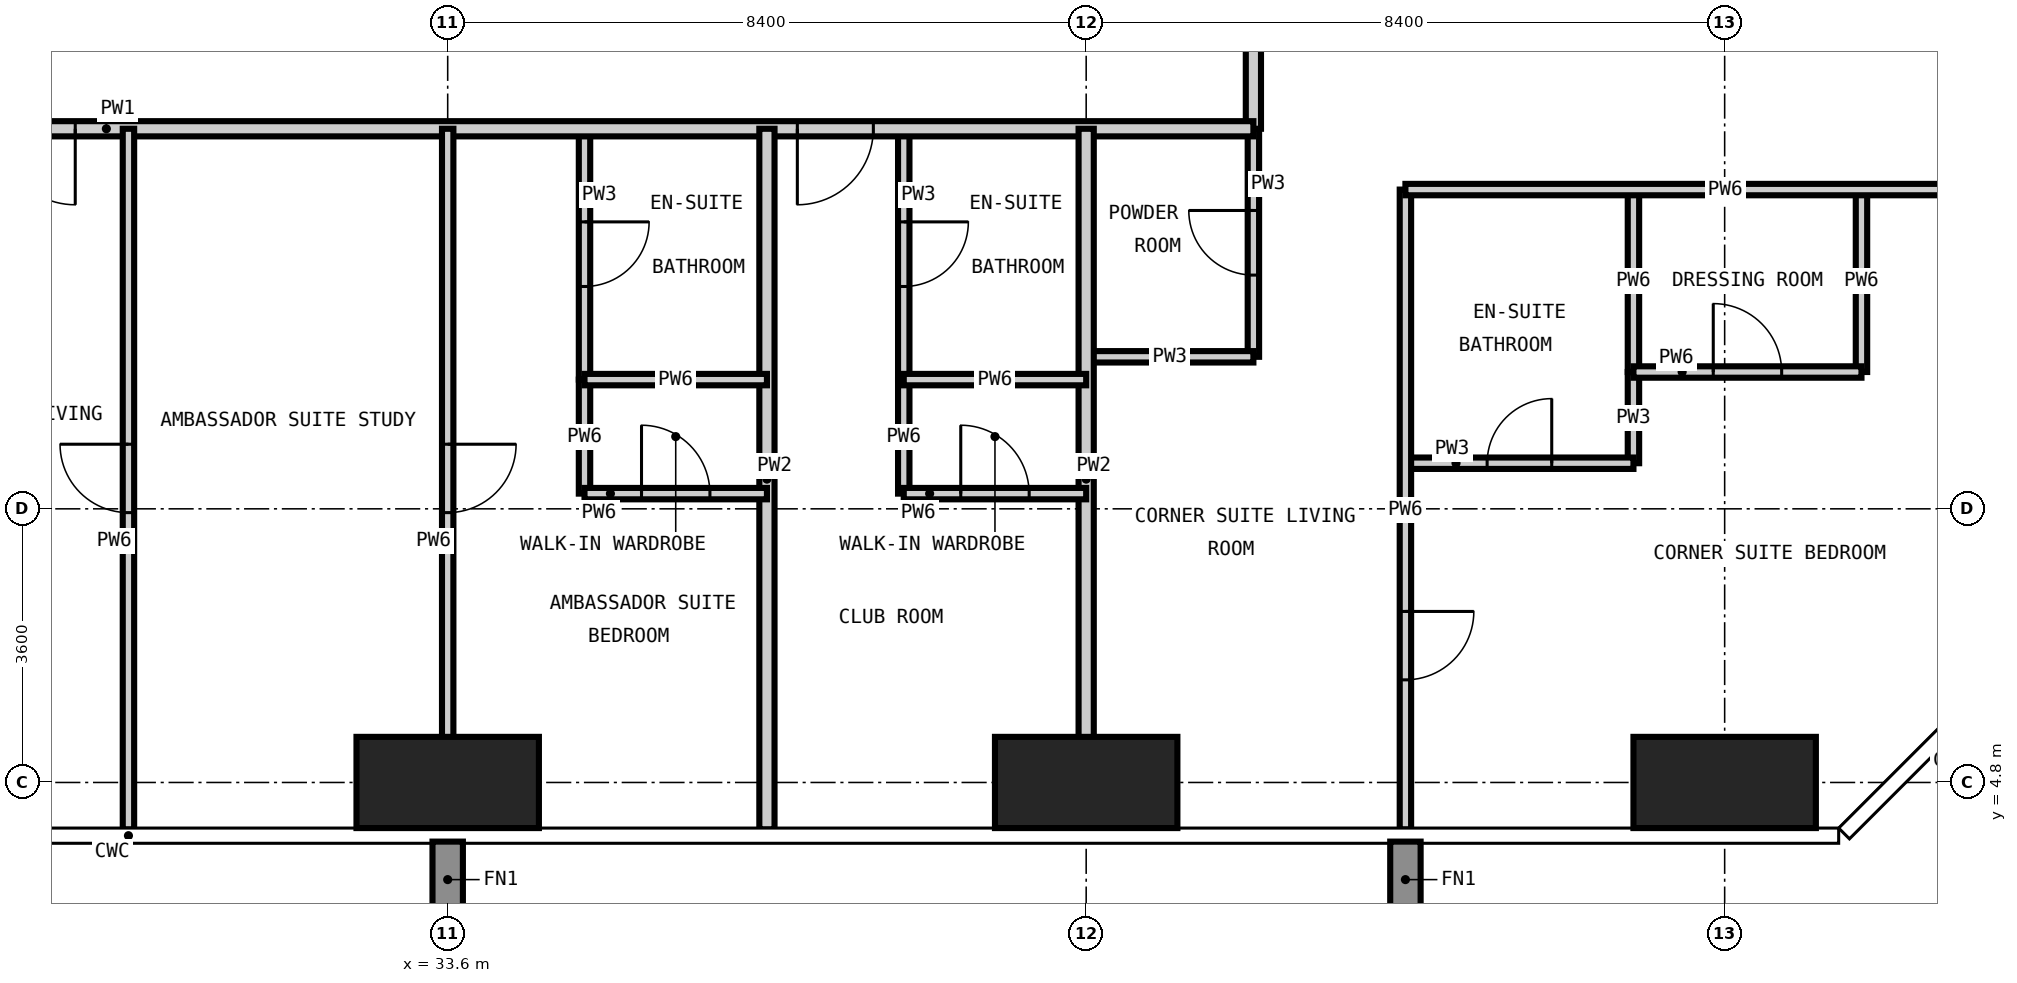
"""IFC4 building model, lengths in metres.
Left out: names, types, materials, properties, quantities, classifications, styles, units other than length and angle.
Written with IfcOpenShell. Run it as: python <this file> out.ifc"""

import sys

from ifc_helpers import new_model, si_unit, direction, frame, frame_2d, origin, origin_2d, place, context, subcontext, project, spatial, rectangle, extrude, element, fill, save


model = new_model("IFC4")
c1 = context("Model", 3, precision=1e-05, world=origin(), true_north=direction((0.0, 1.0)))
c2 = subcontext(c1, "Body", "Model", "MODEL_VIEW")
j1 = project(units=[si_unit("LENGTHUNIT", "METRE"), si_unit("PLANEANGLEUNIT", "RADIAN")], contexts=[c1])
p1 = place(None, origin())
s1 = spatial("IfcSite", under=j1, at=p1, CompositionType="ELEMENT")
p2 = place(p1, origin())
s2 = spatial("IfcBuilding", under=s1, at=p2, CompositionType="ELEMENT")
p3 = place(p2, frame((0.0, 0.0, 198.6)))
s3 = spatial("IfcBuildingStorey", under=s2, at=p3, CompositionType="ELEMENT", Elevation=198.6)
for number, where, z_axis, x_axis in (
    (1, (33.6, 4.8, -0.35), (0.0, 0.0, 1.0), (1.0, 0.0, 0.0)),
    (2, (42.0, 4.8, -0.35), (0.0, 0.0, 1.0), (1.0, 0.0, 0.0)),
    (3, (50.4, 4.8, -0.35), (0.0, 0.0, 1.0), (1.0, 0.0, 0.0)),
):
    element("IfcColumn", number, at=place(p3, frame(where, z_axis=z_axis, x_axis=x_axis)), inside=s3, PredefinedType="COLUMN", context=c2, shape_type="SweptSolid", body=[
        extrude(rectangle(XDim=2.4, YDim=1.2, at=origin_2d()), origin(), (0.0, 0.0, 1.0), 3.6),
    ])
p4 = place(p3, frame((35.4, 10.1, 0.0), z_axis=(0.0, 0.0, 1.0), x_axis=(0.0, 1.0, 0.0)))
e4 = element("IfcWall", 4, at=p4, inside=s3, PredefinedType="PARTITIONING", context=c2, shape_type="SweptSolid", body=[
    extrude(rectangle(XDim=3.3, YDim=0.15, at=frame_2d((1.65, 0.0))), origin(), (0.0, 0.0, 1.0), 3.25),
])
p5 = place(p4, frame((1.225, 0.0, 0.0)))
e5 = element("IfcOpeningElement", 5, at=p5, cuts=e4, PredefinedType="OPENING", context=c2, shape_type="SweptSolid", body=[
    extrude(rectangle(XDim=0.85, YDim=2.1, at=frame_2d((0.425, 1.05))), frame((0.0, 0.085, 0.0), z_axis=(0.0, -1.0, 0.0), x_axis=(1.0, 0.0, 0.0)), (0.0, 0.0, 1.0), 0.17),
])
p6 = place(p3, frame((39.6, 10.1, 0.0), z_axis=(0.0, 0.0, 1.0), x_axis=(0.0, 1.0, 0.0)))
e6 = element("IfcWall", 6, at=p6, inside=s3, PredefinedType="PARTITIONING", context=c2, shape_type="SweptSolid", body=[
    extrude(rectangle(XDim=3.3, YDim=0.15, at=frame_2d((1.65, 0.0))), origin(), (0.0, 0.0, 1.0), 3.25),
])
p7 = place(p6, frame((1.225, 0.0, 0.0)))
e7 = element("IfcOpeningElement", 7, at=p7, cuts=e6, PredefinedType="OPENING", context=c2, shape_type="SweptSolid", body=[
    extrude(rectangle(XDim=0.85, YDim=2.1, at=frame_2d((0.425, 1.05))), frame((0.0, 0.085, 0.0), z_axis=(0.0, -1.0, 0.0), x_axis=(1.0, 0.0, 0.0)), (0.0, 0.0, 1.0), 0.17),
])
p8 = place(p3, frame((44.2, 10.4, 0.0), z_axis=(0.0, 0.0, 1.0), x_axis=(0.0, 1.0, 0.0)))
e8 = element("IfcWall", 8, at=p8, inside=s3, PredefinedType="PARTITIONING", context=c2, shape_type="SweptSolid", body=[
    extrude(rectangle(XDim=3.0, YDim=0.15, at=frame_2d((1.5, 0.0))), origin(), (0.0, 0.0, 1.0), 3.25),
])
p9 = place(p8, frame((1.075, 0.0, 0.0)))
e9 = element("IfcOpeningElement", 9, at=p9, cuts=e8, PredefinedType="OPENING", context=c2, shape_type="SweptSolid", body=[
    extrude(rectangle(XDim=0.85, YDim=2.1, at=frame_2d((0.425, 1.05))), frame((0.0, 0.085, 0.0), z_axis=(0.0, -1.0, 0.0), x_axis=(1.0, 0.0, 0.0)), (0.0, 0.0, 1.0), 0.17),
])
p10 = place(p3, frame((49.2, 9.0, 0.0), z_axis=(0.0, 0.0, 1.0), x_axis=(0.0, 1.0, 0.0)))
e10 = element("IfcWall", 10, at=p10, inside=s3, PredefinedType="PARTITIONING", context=c2, shape_type="SweptSolid", body=[
    extrude(rectangle(XDim=1.2, YDim=0.15, at=frame_2d((0.6, 0.0))), origin(), (0.0, 0.0, 1.0), 3.25),
])
p11 = place(p3, frame((46.2, 9.0, 0.0), z_axis=(0.0, 0.0, 1.0), x_axis=(1.0, 0.0, 0.0)))
e11 = element("IfcWall", 11, at=p11, inside=s3, PredefinedType="PARTITIONING", context=c2, shape_type="SweptSolid", body=[
    extrude(rectangle(XDim=3.0, YDim=0.15, at=frame_2d((1.5, 0.0))), origin(), (0.0, 0.0, 1.0), 3.25),
])
p12 = place(p11, frame((1.075, 0.0, 0.0)))
e12 = element("IfcOpeningElement", 12, at=p12, cuts=e11, PredefinedType="OPENING", context=c2, shape_type="SweptSolid", body=[
    extrude(rectangle(XDim=0.85, YDim=2.1, at=frame_2d((0.425, 1.05))), frame((0.0, 0.085, 0.0), z_axis=(0.0, -1.0, 0.0), x_axis=(1.0, 0.0, 0.0)), (0.0, 0.0, 1.0), 0.17),
])
p13 = place(p3, frame((42.0, 10.4, 0.0), z_axis=(0.0, 0.0, 1.0), x_axis=(1.0, 0.0, 0.0)))
e13 = element("IfcWall", 13, at=p13, inside=s3, PredefinedType="PARTITIONING", context=c2, shape_type="SweptSolid", body=[
    extrude(rectangle(XDim=2.2, YDim=0.15, at=frame_2d((1.1, 0.0))), origin(), (0.0, 0.0, 1.0), 3.25),
])
p14 = place(p3, frame((44.2, 44.8, 0.0), z_axis=(0.0, 0.0, 1.0), x_axis=(0.0, -1.0, 0.0)))
e14 = element("IfcWall", 14, at=p14, inside=s3, PredefinedType="PARTITIONING", context=c2, shape_type="SweptSolid", body=[
    extrude(rectangle(XDim=31.4, YDim=0.2, at=frame_2d((15.7, 0.0))), origin(), (0.0, 0.0, 1.0), 3.25),
])
p15 = place(p14, frame((21.2, 0.0, 0.0)))
e15 = element("IfcOpeningElement", 15, at=p15, cuts=e14, PredefinedType="OPENING", context=c2, shape_type="SweptSolid", body=[
    extrude(rectangle(XDim=1.0, YDim=2.2, at=frame_2d((0.5, 1.1))), frame((0.0, 0.11, 0.0), z_axis=(0.0, -1.0, 0.0), x_axis=(1.0, 0.0, 0.0)), (0.0, 0.0, 1.0), 0.22),
])
p16 = place(p14, frame((8.6, 0.0, 0.0)))
e16 = element("IfcOpeningElement", 16, at=p16, cuts=e14, PredefinedType="OPENING", context=c2, shape_type="SweptSolid", body=[
    extrude(rectangle(XDim=1.0, YDim=2.2, at=frame_2d((0.5, 1.1))), frame((0.0, 0.11, 0.0), z_axis=(0.0, -1.0, 0.0), x_axis=(1.0, 0.0, 0.0)), (0.0, 0.0, 1.0), 0.22),
])
p17 = place(p14, frame((29.2, 0.0, 0.0)))
e17 = element("IfcOpeningElement", 17, at=p17, cuts=e14, PredefinedType="OPENING", context=c2, shape_type="SweptSolid", body=[
    extrude(rectangle(XDim=1.0, YDim=2.2, at=frame_2d((0.5, 1.1))), frame((0.0, 0.11, 0.0), z_axis=(0.0, -1.0, 0.0), x_axis=(1.0, 0.0, 0.0)), (0.0, 0.0, 1.0), 0.22),
])
p18 = place(p14, frame((0.9, 0.0, 0.0)))
e18 = element("IfcOpeningElement", 18, at=p18, cuts=e14, PredefinedType="OPENING", context=c2, shape_type="SweptSolid", body=[
    extrude(rectangle(XDim=1.0, YDim=2.2, at=frame_2d((0.5, 1.1))), frame((0.0, 0.11, 0.0), z_axis=(0.0, -1.0, 0.0), x_axis=(1.0, 0.0, 0.0)), (0.0, 0.0, 1.0), 0.22),
])
p19 = place(p3, frame((44.2, 13.4, 0.0), z_axis=(0.0, 0.0, 1.0), x_axis=(-1.0, 0.0, 0.0)))
e19 = element("IfcWall", 19, at=p19, inside=s3, PredefinedType="PARTITIONING", context=c2, shape_type="SweptSolid", body=[
    extrude(rectangle(XDim=30.8, YDim=0.2, at=frame_2d((15.4, 0.0))), origin(), (0.0, 0.0, 1.0), 3.25),
])
p20 = place(p19, frame((23.6, 0.0, 0.0)))
e20 = element("IfcOpeningElement", 20, at=p20, cuts=e19, PredefinedType="OPENING", context=c2, shape_type="SweptSolid", body=[
    extrude(rectangle(XDim=1.0, YDim=2.2, at=frame_2d((0.5, 1.1))), frame((0.0, 0.11, 0.0), z_axis=(0.0, -1.0, 0.0), x_axis=(1.0, 0.0, 0.0)), (0.0, 0.0, 1.0), 0.22),
])
p21 = place(p19, frame((21.8, 0.0, 0.0)))
e21 = element("IfcOpeningElement", 21, at=p21, cuts=e19, PredefinedType="OPENING", context=c2, shape_type="SweptSolid", body=[
    extrude(rectangle(XDim=1.0, YDim=2.2, at=frame_2d((0.5, 1.1))), frame((0.0, 0.11, 0.0), z_axis=(0.0, -1.0, 0.0), x_axis=(1.0, 0.0, 0.0)), (0.0, 0.0, 1.0), 0.22),
])
p22 = place(p19, frame((15.5, 0.0, 0.0)))
e22 = element("IfcOpeningElement", 22, at=p22, cuts=e19, PredefinedType="OPENING", context=c2, shape_type="SweptSolid", body=[
    extrude(rectangle(XDim=1.0, YDim=2.2, at=frame_2d((0.5, 1.1))), frame((0.0, 0.11, 0.0), z_axis=(0.0, -1.0, 0.0), x_axis=(1.0, 0.0, 0.0)), (0.0, 0.0, 1.0), 0.22),
])
p23 = place(p19, frame((5.0, 0.0, 0.0)))
e23 = element("IfcOpeningElement", 23, at=p23, cuts=e19, PredefinedType="OPENING", context=c2, shape_type="SweptSolid", body=[
    extrude(rectangle(XDim=1.0, YDim=2.2, at=frame_2d((0.5, 1.1))), frame((0.0, 0.11, 0.0), z_axis=(0.0, -1.0, 0.0), x_axis=(1.0, 0.0, 0.0)), (0.0, 0.0, 1.0), 0.22),
])
for number, where, z_axis, x_axis in (
    (24, (37.8, 4.182, 0.0), (0.0, 0.0, 1.0), (0.0, 1.0, 0.0)),
    (25, (42.0, 4.182, 0.0), (0.0, 0.0, 1.0), (0.0, 1.0, 0.0)),
):
    element("IfcWall", number, at=place(p3, frame(where, z_axis=z_axis, x_axis=x_axis)), inside=s3, PredefinedType="PARTITIONING", context=c2, shape_type="SweptSolid", body=[
        extrude(rectangle(XDim=9.218, YDim=0.2, at=frame_2d((4.609, 0.0))), origin(), (0.0, 0.0, 1.0), 3.25),
    ])
p24 = place(p3, frame((29.4, 4.182, 0.0), z_axis=(0.0, 0.0, 1.0), x_axis=(0.0, 1.0, 0.0)))
e26 = element("IfcWall", 26, at=p24, inside=s3, PredefinedType="PARTITIONING", context=c2, shape_type="SweptSolid", body=[
    extrude(rectangle(XDim=9.218, YDim=0.15, at=frame_2d((4.609, 0.0))), origin(), (0.0, 0.0, 1.0), 3.25),
])
p25 = place(p24, frame((4.168, 0.0, 0.0)))
e27 = element("IfcOpeningElement", 27, at=p25, cuts=e26, PredefinedType="OPENING", context=c2, shape_type="SweptSolid", body=[
    extrude(rectangle(XDim=0.9, YDim=2.1, at=frame_2d((0.45, 1.05))), frame((0.0, 0.085, 0.0), z_axis=(0.0, -1.0, 0.0), x_axis=(1.0, 0.0, 0.0)), (0.0, 0.0, 1.0), 0.17),
])
p26 = place(p3, frame((33.6, 4.182, 0.0), z_axis=(0.0, 0.0, 1.0), x_axis=(0.0, 1.0, 0.0)))
e28 = element("IfcWall", 28, at=p26, inside=s3, PredefinedType="PARTITIONING", context=c2, shape_type="SweptSolid", body=[
    extrude(rectangle(XDim=9.218, YDim=0.15, at=frame_2d((4.609, 0.0))), origin(), (0.0, 0.0, 1.0), 3.25),
])
p27 = place(p26, frame((4.168, 0.0, 0.0)))
e29 = element("IfcOpeningElement", 29, at=p27, cuts=e28, PredefinedType="OPENING", context=c2, shape_type="SweptSolid", body=[
    extrude(rectangle(XDim=0.9, YDim=2.1, at=frame_2d((0.45, 1.05))), frame((0.0, 0.085, 0.0), z_axis=(0.0, -1.0, 0.0), x_axis=(1.0, 0.0, 0.0)), (0.0, 0.0, 1.0), 0.17),
])
for number, where, z_axis, x_axis in (
    (30, (35.4, 8.6, 0.0), (0.0, 0.0, 1.0), (0.0, 1.0, 0.0)),
    (31, (39.6, 8.6, 0.0), (0.0, 0.0, 1.0), (0.0, 1.0, 0.0)),
):
    element("IfcWall", number, at=place(p3, frame(where, z_axis=z_axis, x_axis=x_axis)), inside=s3, PredefinedType="PARTITIONING", context=c2, shape_type="SweptSolid", body=[
        extrude(rectangle(XDim=1.5, YDim=0.15, at=frame_2d((0.75, 0.0))), origin(), (0.0, 0.0, 1.0), 3.25),
    ])
p28 = place(p3, frame((46.2, 4.182, 0.0), z_axis=(0.0, 0.0, 1.0), x_axis=(0.0, 1.0, 0.0)))
e32 = element("IfcWall", 32, at=p28, inside=s3, PredefinedType="PARTITIONING", context=c2, shape_type="SweptSolid", body=[
    extrude(rectangle(XDim=8.418, YDim=0.15, at=frame_2d((4.209, 0.0))), origin(), (0.0, 0.0, 1.0), 3.25),
])
p29 = place(p28, frame((1.968, 0.0, 0.0)))
e33 = element("IfcOpeningElement", 33, at=p29, cuts=e32, PredefinedType="OPENING", context=c2, shape_type="SweptSolid", body=[
    extrude(rectangle(XDim=0.9, YDim=2.1, at=frame_2d((0.45, 1.05))), frame((0.0, 0.085, 0.0), z_axis=(0.0, -1.0, 0.0), x_axis=(1.0, 0.0, 0.0)), (0.0, 0.0, 1.0), 0.17),
])
for number, where, z_axis, x_axis in (
    (34, (49.2, 10.2, 0.0), (0.0, 0.0, 1.0), (0.0, 1.0, 0.0)),
    (35, (52.2, 10.2, 0.0), (0.0, 0.0, 1.0), (0.0, 1.0, 0.0)),
):
    element("IfcWall", number, at=place(p3, frame(where, z_axis=z_axis, x_axis=x_axis)), inside=s3, PredefinedType="PARTITIONING", context=c2, shape_type="SweptSolid", body=[
        extrude(rectangle(XDim=2.4, YDim=0.15, at=frame_2d((1.2, 0.0))), origin(), (0.0, 0.0, 1.0), 3.25),
    ])
p30 = place(p3, frame((35.4, 8.6, 0.0), z_axis=(0.0, 0.0, 1.0), x_axis=(1.0, 0.0, 0.0)))
e36 = element("IfcWall", 36, at=p30, inside=s3, PredefinedType="PARTITIONING", context=c2, shape_type="SweptSolid", body=[
    extrude(rectangle(XDim=2.4, YDim=0.15, at=frame_2d((1.2, 0.0))), origin(), (0.0, 0.0, 1.0), 3.25),
])
p31 = place(p30, frame((0.75, 0.0, 0.0)))
e37 = element("IfcOpeningElement", 37, at=p31, cuts=e36, PredefinedType="OPENING", context=c2, shape_type="SweptSolid", body=[
    extrude(rectangle(XDim=0.9, YDim=2.1, at=frame_2d((0.45, 1.05))), frame((0.0, 0.085, 0.0), z_axis=(0.0, -1.0, 0.0), x_axis=(1.0, 0.0, 0.0)), (0.0, 0.0, 1.0), 0.17),
])
p32 = place(p3, frame((39.6, 8.6, 0.0), z_axis=(0.0, 0.0, 1.0), x_axis=(1.0, 0.0, 0.0)))
e38 = element("IfcWall", 38, at=p32, inside=s3, PredefinedType="PARTITIONING", context=c2, shape_type="SweptSolid", body=[
    extrude(rectangle(XDim=2.4, YDim=0.15, at=frame_2d((1.2, 0.0))), origin(), (0.0, 0.0, 1.0), 3.25),
])
p33 = place(p32, frame((0.75, 0.0, 0.0)))
e39 = element("IfcOpeningElement", 39, at=p33, cuts=e38, PredefinedType="OPENING", context=c2, shape_type="SweptSolid", body=[
    extrude(rectangle(XDim=0.9, YDim=2.1, at=frame_2d((0.45, 1.05))), frame((0.0, 0.085, 0.0), z_axis=(0.0, -1.0, 0.0), x_axis=(1.0, 0.0, 0.0)), (0.0, 0.0, 1.0), 0.17),
])
p34 = place(p3, frame((35.4, 10.1, 0.0), z_axis=(0.0, 0.0, 1.0), x_axis=(1.0, 0.0, 0.0)))
e40 = element("IfcWall", 40, at=p34, inside=s3, PredefinedType="PARTITIONING", context=c2, shape_type="SweptSolid", body=[
    extrude(rectangle(XDim=2.4, YDim=0.15, at=frame_2d((1.2, 0.0))), origin(), (0.0, 0.0, 1.0), 3.25),
])
p35 = place(p3, frame((39.6, 10.1, 0.0), z_axis=(0.0, 0.0, 1.0), x_axis=(1.0, 0.0, 0.0)))
e41 = element("IfcWall", 41, at=p35, inside=s3, PredefinedType="PARTITIONING", context=c2, shape_type="SweptSolid", body=[
    extrude(rectangle(XDim=2.4, YDim=0.15, at=frame_2d((1.2, 0.0))), origin(), (0.0, 0.0, 1.0), 3.25),
])
p36 = place(p3, frame((49.2, 10.2, 0.0), z_axis=(0.0, 0.0, 1.0), x_axis=(1.0, 0.0, 0.0)))
e42 = element("IfcWall", 42, at=p36, inside=s3, PredefinedType="PARTITIONING", context=c2, shape_type="SweptSolid", body=[
    extrude(rectangle(XDim=3.0, YDim=0.15, at=frame_2d((1.5, 0.0))), origin(), (0.0, 0.0, 1.0), 3.25),
])
p37 = place(p36, frame((1.05, 0.0, 0.0)))
e43 = element("IfcOpeningElement", 43, at=p37, cuts=e42, PredefinedType="OPENING", context=c2, shape_type="SweptSolid", body=[
    extrude(rectangle(XDim=0.9, YDim=2.1, at=frame_2d((0.45, 1.05))), frame((0.0, 0.085, 0.0), z_axis=(0.0, -1.0, 0.0), x_axis=(1.0, 0.0, 0.0)), (0.0, 0.0, 1.0), 0.17),
])
p38 = place(p3, frame((46.2, 12.6, 0.0), z_axis=(0.0, 0.0, 1.0), x_axis=(1.0, 0.0, 0.0)))
e44 = element("IfcWall", 44, at=p38, inside=s3, PredefinedType="PARTITIONING", context=c2, shape_type="SweptSolid", body=[
    extrude(rectangle(XDim=8.418, YDim=0.15, at=frame_2d((4.209, 0.0))), origin(), (0.0, 0.0, 1.0), 3.25),
])
p39 = place(p22, origin())
e45 = element("IfcDoor", 45, at=p39, inside=s3, OperationType="SINGLE_SWING_LEFT", PredefinedType="DOOR", context=c2, shape_type="SweptSolid", body=[
    extrude(rectangle(XDim=1.0, YDim=2.2, at=frame_2d((0.5, 1.1))), frame((0.0, 0.025, 0.0), z_axis=(0.0, -1.0, 0.0), x_axis=(1.0, 0.0, 0.0)), (0.0, 0.0, 1.0), 0.05),
])
fill(e22, e45)
p40 = place(p25, origin())
e46 = element("IfcDoor", 46, at=p40, inside=s3, OperationType="SINGLE_SWING_RIGHT", PredefinedType="DOOR", context=c2, shape_type="SweptSolid", body=[
    extrude(rectangle(XDim=0.9, YDim=2.1, at=frame_2d((0.45, 1.05))), frame((0.0, 0.025, 0.0), z_axis=(0.0, -1.0, 0.0), x_axis=(1.0, 0.0, 0.0)), (0.0, 0.0, 1.0), 0.05),
])
fill(e27, e46)
p41 = place(p27, frame((0.9, 0.0, 0.0), z_axis=(0.0, 0.0, 1.0), x_axis=(-1.0, 0.0, 0.0)))
e47 = element("IfcDoor", 47, at=p41, inside=s3, OperationType="SINGLE_SWING_LEFT", PredefinedType="DOOR", context=c2, shape_type="SweptSolid", body=[
    extrude(rectangle(XDim=0.9, YDim=2.1, at=frame_2d((0.45, 1.05))), frame((0.0, 0.025, 0.0), z_axis=(0.0, -1.0, 0.0), x_axis=(1.0, 0.0, 0.0)), (0.0, 0.0, 1.0), 0.05),
])
fill(e29, e47)
p42 = place(p5, frame((0.85, 0.0, 0.0), z_axis=(0.0, 0.0, 1.0), x_axis=(-1.0, 0.0, 0.0)))
e48 = element("IfcDoor", 48, at=p42, inside=s3, OperationType="SINGLE_SWING_LEFT", PredefinedType="DOOR", context=c2, shape_type="SweptSolid", body=[
    extrude(rectangle(XDim=0.85, YDim=2.1, at=frame_2d((0.425, 1.05))), frame((0.0, 0.025, 0.0), z_axis=(0.0, -1.0, 0.0), x_axis=(1.0, 0.0, 0.0)), (0.0, 0.0, 1.0), 0.05),
])
fill(e5, e48)
p43 = place(p31, origin())
e49 = element("IfcDoor", 49, at=p43, inside=s3, OperationType="SINGLE_SWING_LEFT", PredefinedType="DOOR", context=c2, shape_type="SweptSolid", body=[
    extrude(rectangle(XDim=0.9, YDim=2.1, at=frame_2d((0.45, 1.05))), frame((0.0, 0.025, 0.0), z_axis=(0.0, -1.0, 0.0), x_axis=(1.0, 0.0, 0.0)), (0.0, 0.0, 1.0), 0.05),
])
fill(e37, e49)
p44 = place(p23, origin())
e50 = element("IfcDoor", 50, at=p44, inside=s3, OperationType="SINGLE_SWING_RIGHT", PredefinedType="DOOR", context=c2, shape_type="SweptSolid", body=[
    extrude(rectangle(XDim=1.0, YDim=2.2, at=frame_2d((0.5, 1.1))), frame((0.0, 0.025, 0.0), z_axis=(0.0, -1.0, 0.0), x_axis=(1.0, 0.0, 0.0)), (0.0, 0.0, 1.0), 0.05),
])
fill(e23, e50)
p45 = place(p7, frame((0.85, 0.0, 0.0), z_axis=(0.0, 0.0, 1.0), x_axis=(-1.0, 0.0, 0.0)))
e51 = element("IfcDoor", 51, at=p45, inside=s3, OperationType="SINGLE_SWING_LEFT", PredefinedType="DOOR", context=c2, shape_type="SweptSolid", body=[
    extrude(rectangle(XDim=0.85, YDim=2.1, at=frame_2d((0.425, 1.05))), frame((0.0, 0.025, 0.0), z_axis=(0.0, -1.0, 0.0), x_axis=(1.0, 0.0, 0.0)), (0.0, 0.0, 1.0), 0.05),
])
fill(e7, e51)
p46 = place(p33, origin())
e52 = element("IfcDoor", 52, at=p46, inside=s3, OperationType="SINGLE_SWING_LEFT", PredefinedType="DOOR", context=c2, shape_type="SweptSolid", body=[
    extrude(rectangle(XDim=0.9, YDim=2.1, at=frame_2d((0.45, 1.05))), frame((0.0, 0.025, 0.0), z_axis=(0.0, -1.0, 0.0), x_axis=(1.0, 0.0, 0.0)), (0.0, 0.0, 1.0), 0.05),
])
fill(e39, e52)
p47 = place(p9, origin())
e53 = element("IfcDoor", 53, at=p47, inside=s3, OperationType="SINGLE_SWING_RIGHT", PredefinedType="DOOR", context=c2, shape_type="SweptSolid", body=[
    extrude(rectangle(XDim=0.85, YDim=2.1, at=frame_2d((0.425, 1.05))), frame((0.0, 0.025, 0.0), z_axis=(0.0, -1.0, 0.0), x_axis=(1.0, 0.0, 0.0)), (0.0, 0.0, 1.0), 0.05),
])
fill(e9, e53)
p48 = place(p29, frame((0.9, 0.0, 0.0), z_axis=(0.0, 0.0, 1.0), x_axis=(-1.0, 0.0, 0.0)))
e54 = element("IfcDoor", 54, at=p48, inside=s3, OperationType="SINGLE_SWING_LEFT", PredefinedType="DOOR", context=c2, shape_type="SweptSolid", body=[
    extrude(rectangle(XDim=0.9, YDim=2.1, at=frame_2d((0.45, 1.05))), frame((0.0, 0.025, 0.0), z_axis=(0.0, -1.0, 0.0), x_axis=(1.0, 0.0, 0.0)), (0.0, 0.0, 1.0), 0.05),
])
fill(e33, e54)
p49 = place(p12, origin())
e55 = element("IfcDoor", 55, at=p49, inside=s3, OperationType="SINGLE_SWING_RIGHT", PredefinedType="DOOR", context=c2, shape_type="SweptSolid", body=[
    extrude(rectangle(XDim=0.85, YDim=2.1, at=frame_2d((0.425, 1.05))), frame((0.0, 0.025, 0.0), z_axis=(0.0, -1.0, 0.0), x_axis=(1.0, 0.0, 0.0)), (0.0, 0.0, 1.0), 0.05),
])
fill(e12, e55)
p50 = place(p37, origin())
e56 = element("IfcDoor", 56, at=p50, inside=s3, OperationType="SINGLE_SWING_LEFT", PredefinedType="DOOR", context=c2, shape_type="SweptSolid", body=[
    extrude(rectangle(XDim=0.9, YDim=2.1, at=frame_2d((0.45, 1.05))), frame((0.0, 0.025, 0.0), z_axis=(0.0, -1.0, 0.0), x_axis=(1.0, 0.0, 0.0)), (0.0, 0.0, 1.0), 0.05),
])
fill(e43, e56)
save(model, sys.argv[1])
